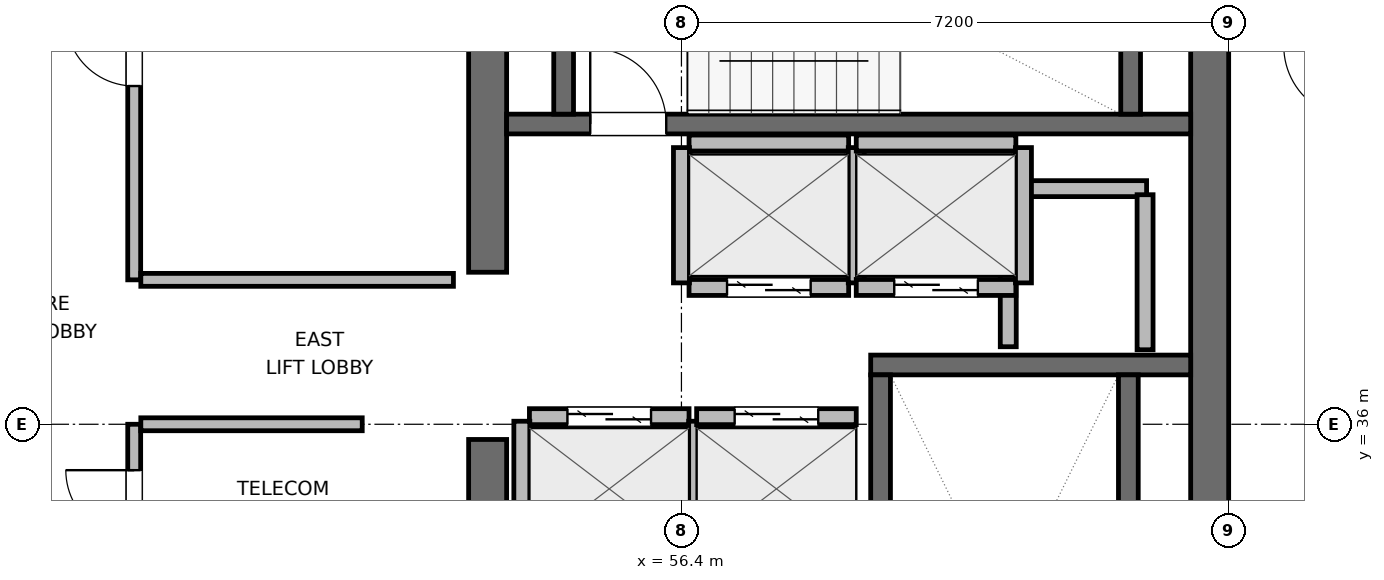
"""IFC4 building model, lengths in metres.
Left out: names, types, materials, properties, quantities, classifications, styles, units other than length and angle.
Written with IfcOpenShell. Run it as: python <this file> out.ifc"""

import sys

from ifc_helpers import new_model, si_unit, direction, frame, frame_2d, origin, place, context, subcontext, project, spatial, rectangle, extrude, element, fill, save


model = new_model("IFC4")
c1 = context("Model", 3, precision=1e-05, world=origin(), true_north=direction((0.0, 1.0)))
c2 = subcontext(c1, "Body", "Model", "MODEL_VIEW")
j1 = project(units=[si_unit("LENGTHUNIT", "METRE"), si_unit("PLANEANGLEUNIT", "RADIAN")], contexts=[c1])
p1 = place(None, origin())
s1 = spatial("IfcSite", under=j1, at=p1, CompositionType="ELEMENT")
p2 = place(p1, origin())
s2 = spatial("IfcBuilding", under=s1, at=p2, CompositionType="ELEMENT")
p3 = place(p2, frame((0.0, 0.0, 314.1)))
s3 = spatial("IfcBuildingStorey", under=s2, at=p3, CompositionType="ELEMENT", Elevation=314.1)
p4 = place(p3, frame((53.85, 27.85, 0.0), z_axis=(0.0, 0.0, 1.0), x_axis=(0.0, 1.0, 0.0)))
e1 = element("IfcWall", 1, at=p4, inside=s3, PredefinedType="SHEAR", context=c2, shape_type="SweptSolid", body=[
    extrude(rectangle(XDim=7.95, YDim=0.5, at=frame_2d((3.975, 0.0))), origin(), (0.0, 0.0, 1.0), 3.9),
])
p5 = place(p3, frame((53.85, 38.0, 0.0), z_axis=(0.0, 0.0, 1.0), x_axis=(0.0, 1.0, 0.0)))
e2 = element("IfcWall", 2, at=p5, inside=s3, PredefinedType="SHEAR", context=c2, shape_type="SweptSolid", body=[
    extrude(rectangle(XDim=6.15, YDim=0.5, at=frame_2d((3.075, 0.0))), origin(), (0.0, 0.0, 1.0), 3.9),
])
p6 = place(p3, frame((63.35, 27.6, 0.0), z_axis=(0.0, 0.0, 1.0), x_axis=(0.0, 1.0, 0.0)))
e3 = element("IfcWall", 3, at=p6, inside=s3, PredefinedType="SHEAR", context=c2, shape_type="SweptSolid", body=[
    extrude(rectangle(XDim=16.8, YDim=0.5, at=frame_2d((8.4, 0.0))), origin(), (0.0, 0.0, 1.0), 3.9),
])
p7 = place(p3, frame((58.89, 36.78, 0.0), z_axis=(0.0, 0.0, 1.0), x_axis=(1.0, 0.0, 0.0)))
e4 = element("IfcWall", 4, at=p7, inside=s3, PredefinedType="SHEAR", context=c2, shape_type="SweptSolid", body=[
    extrude(rectangle(XDim=4.21, YDim=0.26, at=frame_2d((2.105, 0.0))), origin(), (0.0, 0.0, 1.0), 3.9),
])
p8 = place(p3, frame((59.02, 29.05, 0.0), z_axis=(0.0, 0.0, 1.0), x_axis=(0.0, 1.0, 0.0)))
e5 = element("IfcWall", 5, at=p8, inside=s3, PredefinedType="SHEAR", context=c2, shape_type="SweptSolid", body=[
    extrude(rectangle(XDim=7.6, YDim=0.26, at=frame_2d((3.8, 0.0))), origin(), (0.0, 0.0, 1.0), 3.9),
])
p9 = place(p8, frame((0.3, 0.0, 0.0)))
e6 = element("IfcOpeningElement", 6, at=p9, cuts=e5, PredefinedType="OPENING", context=c2, shape_type="SweptSolid", body=[
    extrude(rectangle(XDim=1.0, YDim=2.04, at=frame_2d((0.5, 1.02))), frame((0.0, 0.14, 0.0), z_axis=(0.0, -1.0, 0.0), x_axis=(1.0, 0.0, 0.0)), (0.0, 0.0, 1.0), 0.28),
])
p10 = place(p3, frame((62.28, 29.05, 0.0), z_axis=(0.0, 0.0, 1.0), x_axis=(0.0, 1.0, 0.0)))
e7 = element("IfcWall", 7, at=p10, inside=s3, PredefinedType="SHEAR", context=c2, shape_type="SweptSolid", body=[
    extrude(rectangle(XDim=7.6, YDim=0.26, at=frame_2d((3.8, 0.0))), origin(), (0.0, 0.0, 1.0), 3.9),
])
p11 = place(p3, frame((54.1, 39.95, 0.0), z_axis=(0.0, 0.0, 1.0), x_axis=(1.0, 0.0, 0.0)))
e8 = element("IfcWall", 8, at=p11, inside=s3, PredefinedType="SHEAR", context=c2, shape_type="SweptSolid", body=[
    extrude(rectangle(XDim=9.0, YDim=0.26, at=frame_2d((4.5, 0.0))), origin(), (0.0, 0.0, 1.0), 3.9),
])
p12 = place(p11, frame((1.1, 0.0, 0.0)))
e9 = element("IfcOpeningElement", 9, at=p12, cuts=e8, PredefinedType="OPENING", context=c2, shape_type="SweptSolid", body=[
    extrude(rectangle(XDim=1.0, YDim=2.04, at=frame_2d((0.5, 1.02))), frame((0.0, 0.14, 0.0), z_axis=(0.0, -1.0, 0.0), x_axis=(1.0, 0.0, 0.0)), (0.0, 0.0, 1.0), 0.28),
])
for number, where, z_axis, x_axis in (
    (10, (54.85, 40.08, 0.0), (0.0, 0.0, 1.0), (0.0, 1.0, 0.0)),
    (11, (62.31, 40.08, 0.0), (0.0, 0.0, 1.0), (0.0, 1.0, 0.0)),
):
    element("IfcWall", number, at=place(p3, frame(where, z_axis=z_axis, x_axis=x_axis)), inside=s3, PredefinedType="SHEAR", context=c2, shape_type="SweptSolid", body=[
        extrude(rectangle(XDim=2.94, YDim=0.26, at=frame_2d((1.47, 0.0))), origin(), (0.0, 0.0, 1.0), 3.9),
    ])
p13 = place(p3, frame((60.72, 39.1, 0.0), z_axis=(0.0, 0.0, 1.0), x_axis=(1.0, 0.0, 0.0)))
e12 = element("IfcWall", 12, at=p13, inside=s3, PredefinedType="PARTITIONING", context=c2, shape_type="SweptSolid", body=[
    extrude(rectangle(XDim=1.8, YDim=0.21, at=frame_2d((0.9, 0.0))), origin(), (0.0, 0.0, 1.0), 3.68),
])
p14 = place(p3, frame((60.7, 37.02, 0.0), z_axis=(0.0, 0.0, 1.0), x_axis=(0.0, 1.0, 0.0)))
e13 = element("IfcWall", 13, at=p14, inside=s3, PredefinedType="PARTITIONING", context=c2, shape_type="SweptSolid", body=[
    extrude(rectangle(XDim=1.96, YDim=0.21, at=frame_2d((0.98, 0.0))), origin(), (0.0, 0.0, 1.0), 3.68),
])
p15 = place(p3, frame((62.5, 36.98, 0.0), z_axis=(0.0, 0.0, 1.0), x_axis=(0.0, 1.0, 0.0)))
e14 = element("IfcWall", 14, at=p15, inside=s3, PredefinedType="PARTITIONING", context=c2, shape_type="SweptSolid", body=[
    extrude(rectangle(XDim=2.04, YDim=0.21, at=frame_2d((1.02, 0.0))), origin(), (0.0, 0.0, 1.0), 3.68),
])
p16 = place(p3, frame((54.4, 36.1, 0.0), z_axis=(0.0, 0.0, 1.0), x_axis=(1.0, 0.0, 0.0)))
e15 = element("IfcWall", 15, at=p16, inside=s3, PredefinedType="PARTITIONING", context=c2, shape_type="SweptSolid", body=[
    extrude(rectangle(XDim=2.1, YDim=0.21, at=frame_2d((1.05, 0.0))), origin(), (0.0, 0.0, 1.0), 3.68),
])
p17 = place(p16, frame((0.5, 0.0, 0.0)))
e16 = element("IfcOpeningElement", 16, at=p17, cuts=e15, PredefinedType="OPENING", context=c2, shape_type="SweptSolid", body=[
    extrude(rectangle(XDim=1.1, YDim=2.04, at=frame_2d((0.55, 1.02))), frame((0.0, 0.115, 0.0), z_axis=(0.0, -1.0, 0.0), x_axis=(1.0, 0.0, 0.0)), (0.0, 0.0, 1.0), 0.23),
])
for number, where, z_axis, x_axis in (
    (17, (54.3, 34.26, 0.0), (0.0, 0.0, 1.0), (0.0, 1.0, 0.0)),
    (18, (56.6, 34.26, 0.0), (0.0, 0.0, 1.0), (0.0, 1.0, 0.0)),
):
    element("IfcWall", number, at=place(p3, frame(where, z_axis=z_axis, x_axis=x_axis)), inside=s3, PredefinedType="PARTITIONING", context=c2, shape_type="SweptSolid", body=[
        extrude(rectangle(XDim=1.78, YDim=0.21, at=frame_2d((0.89, 0.0))), origin(), (0.0, 0.0, 1.0), 3.68),
    ])
p18 = place(p3, frame((56.6, 36.1, 0.0), z_axis=(0.0, 0.0, 1.0), x_axis=(1.0, 0.0, 0.0)))
e19 = element("IfcWall", 19, at=p18, inside=s3, PredefinedType="PARTITIONING", context=c2, shape_type="SweptSolid", body=[
    extrude(rectangle(XDim=2.1, YDim=0.21, at=frame_2d((1.05, 0.0))), origin(), (0.0, 0.0, 1.0), 3.68),
])
p19 = place(p18, frame((0.5, 0.0, 0.0)))
e20 = element("IfcOpeningElement", 20, at=p19, cuts=e19, PredefinedType="OPENING", context=c2, shape_type="SweptSolid", body=[
    extrude(rectangle(XDim=1.1, YDim=2.04, at=frame_2d((0.55, 1.02))), frame((0.0, 0.115, 0.0), z_axis=(0.0, -1.0, 0.0), x_axis=(1.0, 0.0, 0.0)), (0.0, 0.0, 1.0), 0.23),
])
p20 = place(p3, frame((56.5, 37.8, 0.0), z_axis=(0.0, 0.0, 1.0), x_axis=(1.0, 0.0, 0.0)))
e21 = element("IfcWall", 21, at=p20, inside=s3, PredefinedType="PARTITIONING", context=c2, shape_type="SweptSolid", body=[
    extrude(rectangle(XDim=2.1, YDim=0.21, at=frame_2d((1.05, 0.0))), origin(), (0.0, 0.0, 1.0), 3.68),
])
p21 = place(p20, frame((0.5, 0.0, 0.0)))
e22 = element("IfcOpeningElement", 22, at=p21, cuts=e21, PredefinedType="OPENING", context=c2, shape_type="SweptSolid", body=[
    extrude(rectangle(XDim=1.1, YDim=2.04, at=frame_2d((0.55, 1.02))), frame((0.0, 0.115, 0.0), z_axis=(0.0, -1.0, 0.0), x_axis=(1.0, 0.0, 0.0)), (0.0, 0.0, 1.0), 0.23),
])
p22 = place(p3, frame((56.5, 39.7, 0.0), z_axis=(0.0, 0.0, 1.0), x_axis=(1.0, 0.0, 0.0)))
e23 = element("IfcWall", 23, at=p22, inside=s3, PredefinedType="PARTITIONING", context=c2, shape_type="SweptSolid", body=[
    extrude(rectangle(XDim=2.1, YDim=0.21, at=frame_2d((1.05, 0.0))), origin(), (0.0, 0.0, 1.0), 3.68),
])
for number, where, z_axis, x_axis in (
    (24, (56.4, 37.86, 0.0), (0.0, 0.0, 1.0), (0.0, 1.0, 0.0)),
    (25, (58.7, 37.86, 0.0), (0.0, 0.0, 1.0), (0.0, 1.0, 0.0)),
):
    element("IfcWall", number, at=place(p3, frame(where, z_axis=z_axis, x_axis=x_axis)), inside=s3, PredefinedType="PARTITIONING", context=c2, shape_type="SweptSolid", body=[
        extrude(rectangle(XDim=1.78, YDim=0.21, at=frame_2d((0.89, 0.0))), origin(), (0.0, 0.0, 1.0), 3.68),
    ])
p23 = place(p3, frame((58.7, 37.8, 0.0), z_axis=(0.0, 0.0, 1.0), x_axis=(1.0, 0.0, 0.0)))
e26 = element("IfcWall", 26, at=p23, inside=s3, PredefinedType="PARTITIONING", context=c2, shape_type="SweptSolid", body=[
    extrude(rectangle(XDim=2.1, YDim=0.21, at=frame_2d((1.05, 0.0))), origin(), (0.0, 0.0, 1.0), 3.68),
])
p24 = place(p23, frame((0.5, 0.0, 0.0)))
e27 = element("IfcOpeningElement", 27, at=p24, cuts=e26, PredefinedType="OPENING", context=c2, shape_type="SweptSolid", body=[
    extrude(rectangle(XDim=1.1, YDim=2.04, at=frame_2d((0.55, 1.02))), frame((0.0, 0.115, 0.0), z_axis=(0.0, -1.0, 0.0), x_axis=(1.0, 0.0, 0.0)), (0.0, 0.0, 1.0), 0.23),
])
p25 = place(p3, frame((58.7, 39.7, 0.0), z_axis=(0.0, 0.0, 1.0), x_axis=(1.0, 0.0, 0.0)))
e28 = element("IfcWall", 28, at=p25, inside=s3, PredefinedType="PARTITIONING", context=c2, shape_type="SweptSolid", body=[
    extrude(rectangle(XDim=2.1, YDim=0.21, at=frame_2d((1.05, 0.0))), origin(), (0.0, 0.0, 1.0), 3.68),
])
p26 = place(p3, frame((60.9, 37.86, 0.0), z_axis=(0.0, 0.0, 1.0), x_axis=(0.0, 1.0, 0.0)))
e29 = element("IfcWall", 29, at=p26, inside=s3, PredefinedType="PARTITIONING", context=c2, shape_type="SweptSolid", body=[
    extrude(rectangle(XDim=1.78, YDim=0.21, at=frame_2d((0.89, 0.0))), origin(), (0.0, 0.0, 1.0), 3.68),
])
p27 = place(p3, frame((49.2, 32.6, 0.0), z_axis=(0.0, 0.0, 1.0), x_axis=(0.0, 1.0, 0.0)))
e30 = element("IfcWall", 30, at=p27, inside=s3, PredefinedType="PARTITIONING", context=c2, shape_type="SweptSolid", body=[
    extrude(rectangle(XDim=3.4, YDim=0.17, at=frame_2d((1.7, 0.0))), origin(), (0.0, 0.0, 1.0), 3.68),
])
p28 = place(p27, frame((0.196, 0.0, 0.0)))
e31 = element("IfcOpeningElement", 31, at=p28, cuts=e30, PredefinedType="OPENING", context=c2, shape_type="SweptSolid", body=[
    extrude(rectangle(XDim=0.9, YDim=2.02, at=frame_2d((0.45, 1.01))), frame((0.0, 0.095, 0.0), z_axis=(0.0, -1.0, 0.0), x_axis=(1.0, 0.0, 0.0)), (0.0, 0.0, 1.0), 0.19),
])
p29 = place(p27, frame((1.896, 0.0, 0.0)))
e32 = element("IfcOpeningElement", 32, at=p29, cuts=e30, PredefinedType="OPENING", context=c2, shape_type="SweptSolid", body=[
    extrude(rectangle(XDim=0.9, YDim=2.02, at=frame_2d((0.45, 1.01))), frame((0.0, 0.095, 0.0), z_axis=(0.0, -1.0, 0.0), x_axis=(1.0, 0.0, 0.0)), (0.0, 0.0, 1.0), 0.19),
])
p30 = place(p3, frame((49.287, 36.0, 0.0), z_axis=(0.0, 0.0, 1.0), x_axis=(1.0, 0.0, 0.0)))
e33 = element("IfcWall", 33, at=p30, inside=s3, PredefinedType="PARTITIONING", context=c2, shape_type="SweptSolid", body=[
    extrude(rectangle(XDim=2.913, YDim=0.17, at=frame_2d((1.457, 0.0))), origin(), (0.0, 0.0, 1.0), 3.68),
])
p31 = place(p3, frame((49.2, 37.9, 0.0), z_axis=(0.0, 0.0, 1.0), x_axis=(0.0, 1.0, 0.0)))
e34 = element("IfcWall", 34, at=p31, inside=s3, PredefinedType="PARTITIONING", context=c2, shape_type="SweptSolid", body=[
    extrude(rectangle(XDim=6.0, YDim=0.17, at=frame_2d((3.0, 0.0))), origin(), (0.0, 0.0, 1.0), 3.68),
])
p32 = place(p31, frame((2.55, 0.0, 0.0)))
e35 = element("IfcOpeningElement", 35, at=p32, cuts=e34, PredefinedType="OPENING", context=c2, shape_type="SweptSolid", body=[
    extrude(rectangle(XDim=0.9, YDim=2.02, at=frame_2d((0.45, 1.01))), frame((0.0, 0.095, 0.0), z_axis=(0.0, -1.0, 0.0), x_axis=(1.0, 0.0, 0.0)), (0.0, 0.0, 1.0), 0.19),
])
p33 = place(p3, frame((49.287, 37.9, 0.0), z_axis=(0.0, 0.0, 1.0), x_axis=(1.0, 0.0, 0.0)))
e36 = element("IfcWall", 36, at=p33, inside=s3, PredefinedType="PARTITIONING", context=c2, shape_type="SweptSolid", body=[
    extrude(rectangle(XDim=4.113, YDim=0.17, at=frame_2d((2.056, 0.0))), origin(), (0.0, 0.0, 1.0), 3.68),
])
p34 = place(p12, origin())
e37 = element("IfcDoor", 37, at=p34, inside=s3, OperationType="SINGLE_SWING_LEFT", PredefinedType="DOOR", context=c2, shape_type="SweptSolid", body=[
    extrude(rectangle(XDim=1.0, YDim=2.04, at=frame_2d((0.5, 1.02))), frame((0.0, 0.025, 0.0), z_axis=(0.0, -1.0, 0.0), x_axis=(1.0, 0.0, 0.0)), (0.0, 0.0, 1.0), 0.05),
])
fill(e9, e37)
p35 = place(p17, origin())
e38 = element("IfcDoor", 38, at=p35, inside=s3, OperationType="DOUBLE_DOOR_SLIDING", PredefinedType="DOOR", context=c2, shape_type="SweptSolid", body=[
    extrude(rectangle(XDim=1.1, YDim=2.04, at=frame_2d((0.55, 1.02))), frame((0.0, 0.025, 0.0), z_axis=(0.0, -1.0, 0.0), x_axis=(1.0, 0.0, 0.0)), (0.0, 0.0, 1.0), 0.05),
])
fill(e16, e38)
p36 = place(p19, origin())
e39 = element("IfcDoor", 39, at=p36, inside=s3, OperationType="DOUBLE_DOOR_SLIDING", PredefinedType="DOOR", context=c2, shape_type="SweptSolid", body=[
    extrude(rectangle(XDim=1.1, YDim=2.04, at=frame_2d((0.55, 1.02))), frame((0.0, 0.025, 0.0), z_axis=(0.0, -1.0, 0.0), x_axis=(1.0, 0.0, 0.0)), (0.0, 0.0, 1.0), 0.05),
])
fill(e20, e39)
p37 = place(p21, origin())
e40 = element("IfcDoor", 40, at=p37, inside=s3, OperationType="DOUBLE_DOOR_SLIDING", PredefinedType="DOOR", context=c2, shape_type="SweptSolid", body=[
    extrude(rectangle(XDim=1.1, YDim=2.04, at=frame_2d((0.55, 1.02))), frame((0.0, 0.025, 0.0), z_axis=(0.0, -1.0, 0.0), x_axis=(1.0, 0.0, 0.0)), (0.0, 0.0, 1.0), 0.05),
])
fill(e22, e40)
p38 = place(p24, origin())
e41 = element("IfcDoor", 41, at=p38, inside=s3, OperationType="DOUBLE_DOOR_SLIDING", PredefinedType="DOOR", context=c2, shape_type="SweptSolid", body=[
    extrude(rectangle(XDim=1.1, YDim=2.04, at=frame_2d((0.55, 1.02))), frame((0.0, 0.025, 0.0), z_axis=(0.0, -1.0, 0.0), x_axis=(1.0, 0.0, 0.0)), (0.0, 0.0, 1.0), 0.05),
])
fill(e27, e41)
p39 = place(p29, origin())
e42 = element("IfcDoor", 42, at=p39, inside=s3, OperationType="SINGLE_SWING_RIGHT", PredefinedType="DOOR", context=c2, shape_type="SweptSolid", body=[
    extrude(rectangle(XDim=0.9, YDim=2.02, at=frame_2d((0.45, 1.01))), frame((0.0, 0.025, 0.0), z_axis=(0.0, -1.0, 0.0), x_axis=(1.0, 0.0, 0.0)), (0.0, 0.0, 1.0), 0.05),
])
fill(e32, e42)
p40 = place(p32, origin())
e43 = element("IfcDoor", 43, at=p40, inside=s3, OperationType="SINGLE_SWING_RIGHT", PredefinedType="DOOR", context=c2, shape_type="SweptSolid", body=[
    extrude(rectangle(XDim=0.9, YDim=2.02, at=frame_2d((0.45, 1.01))), frame((0.0, 0.025, 0.0), z_axis=(0.0, -1.0, 0.0), x_axis=(1.0, 0.0, 0.0)), (0.0, 0.0, 1.0), 0.05),
])
fill(e35, e43)
save(model, sys.argv[1])
